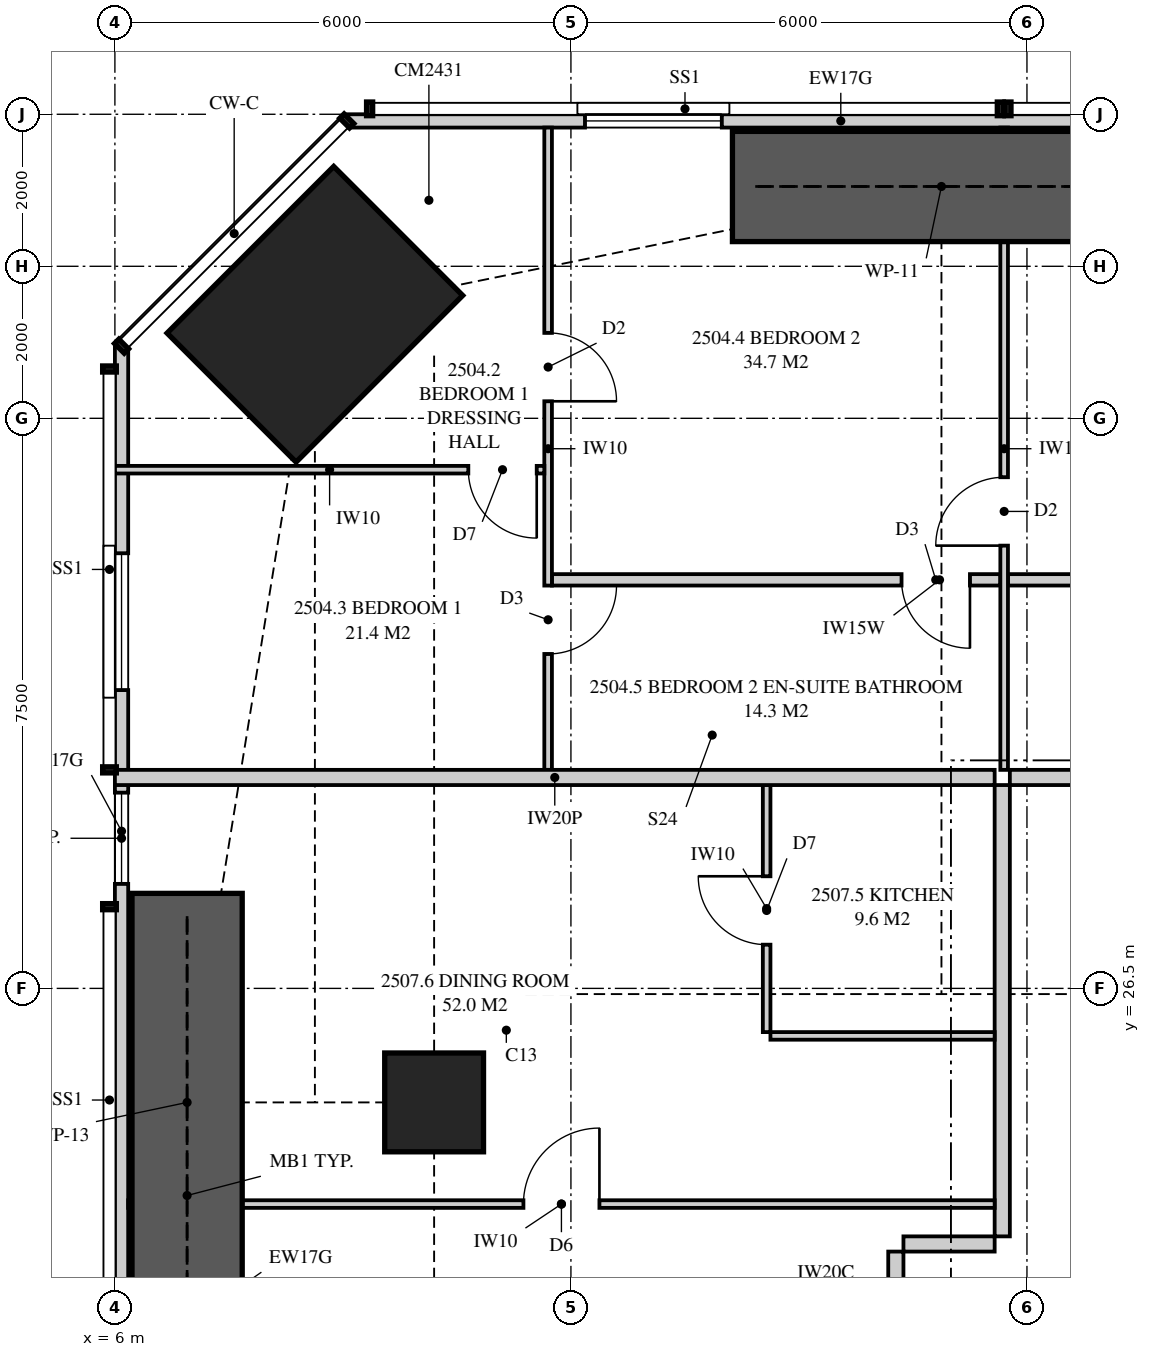
"""IFC4 building model, lengths in metres.
Left out: names, types, materials, properties, quantities, classifications, styles, units other than length and angle.
Written with IfcOpenShell. Run it as: python <this file> out.ifc"""

import sys

from ifc_helpers import new_model, si_unit, direction, frame, frame_2d, origin, origin_2d, place, context, subcontext, project, spatial, polyline, rectangle, outline, extrude, element, fill, save


model = new_model("IFC4")
c1 = context("Model", 3, precision=1e-05, world=origin(), true_north=direction((0.0, 1.0)))
c2 = subcontext(c1, "Body", "Model", "MODEL_VIEW")
j1 = project(units=[si_unit("LENGTHUNIT", "METRE"), si_unit("PLANEANGLEUNIT", "RADIAN")], contexts=[c1])
p1 = place(None, origin())
s1 = spatial("IfcSite", under=j1, at=p1, CompositionType="ELEMENT")
p2 = place(p1, origin())
s2 = spatial("IfcBuilding", under=s1, at=p2, CompositionType="ELEMENT")
p3 = place(p2, frame((0.0, 0.0, 94.8)))
s3 = spatial("IfcBuildingStorey", under=s2, at=p3, CompositionType="ELEMENT", Elevation=94.8)
p4 = place(p3, frame((8.631, 35.369, 0.0), z_axis=(0.0, 0.0, 1.0), x_axis=(0.707106781187, -0.707106781187, 0.0)))
e1 = element("IfcColumn", 1, at=p4, inside=s3, PredefinedType="COLUMN", context=c2, shape_type="SweptSolid", body=[
    extrude(rectangle(XDim=2.4, YDim=3.1, at=origin_2d()), origin(), (0.0, 0.0, 1.0), 3.35),
])
p5 = place(p3, frame((10.2, 25.0, 0.0), z_axis=(0.0, 0.0, 1.0), x_axis=(1.0, 0.0, 0.0)))
e2 = element("IfcColumn", 2, at=p5, inside=s3, PredefinedType="COLUMN", context=c2, shape_type="SweptSolid", body=[
    extrude(rectangle(XDim=1.3, YDim=1.3, at=origin_2d()), origin(), (0.0, 0.0, 1.0), 3.35),
])
p6 = place(p3, frame((22.05, 37.913, 0.0), z_axis=(0.0, 0.0, 1.0), x_axis=(-1.0, 0.0, 0.0)))
e3 = element("IfcWall", 3, at=p6, inside=s3, PredefinedType="SOLIDWALL", context=c2, shape_type="SweptSolid", body=[
    extrude(outline(polyline([(0.0, 0.0), (12.999, 0.0), (12.999, 3.11), (5.378, 3.11), (5.378, 2.15), (5.333, 2.15), (5.333, 3.11), (5.175, 3.11), (5.175, 2.15), (0.0, 2.15), (0.0, 0.0)])), frame((0.0, 0.087, 0.0), z_axis=(0.0, -1.0, 0.0), x_axis=(1.0, 0.0, 0.0)), (0.0, 0.0, 1.0), 0.175),
])
p7 = place(p6, frame((0.492, 0.0, 0.4)))
e4 = element("IfcOpeningElement", 4, at=p7, cuts=e3, PredefinedType="OPENING", context=c2, shape_type="SweptSolid", body=[
    extrude(rectangle(XDim=1.8, YDim=1.7, at=frame_2d((0.9, 0.85))), frame((0.0, 0.097, 0.0), z_axis=(0.0, -1.0, 0.0), x_axis=(1.0, 0.0, 0.0)), (0.0, 0.0, 1.0), 0.195),
])
p8 = place(p6, frame((8.065, 0.0, 0.4)))
e5 = element("IfcOpeningElement", 5, at=p8, cuts=e3, PredefinedType="OPENING", context=c2, shape_type="SweptSolid", body=[
    extrude(rectangle(XDim=1.8, YDim=1.7, at=frame_2d((0.9, 0.85))), frame((0.0, 0.097, 0.0), z_axis=(0.0, -1.0, 0.0), x_axis=(1.0, 0.0, 0.0)), (0.0, 0.0, 1.0), 0.195),
])
p9 = place(p3, frame((6.087, 34.949, 0.0), z_axis=(0.0, 0.0, 1.0), x_axis=(0.0, -1.0, 0.0)))
e6 = element("IfcWall", 6, at=p9, inside=s3, PredefinedType="SOLIDWALL", context=c2, shape_type="SweptSolid", body=[
    extrude(outline(polyline([(0.0, 0.0), (12.761, 0.0), (12.761, 2.15), (9.949, 2.15), (9.949, 3.11), (9.823, 3.11), (9.823, 2.15), (9.73, 2.15), (9.73, 3.11), (0.0, 3.11), (0.0, 0.0)])), frame((0.0, 0.087, 0.0), z_axis=(0.0, -1.0, 0.0), x_axis=(1.0, 0.0, 0.0)), (0.0, 0.0, 1.0), 0.175),
])
p10 = place(p9, frame((2.724, 0.0, 0.4)))
e7 = element("IfcOpeningElement", 7, at=p10, cuts=e6, PredefinedType="OPENING", context=c2, shape_type="SweptSolid", body=[
    extrude(rectangle(XDim=1.8, YDim=1.7, at=frame_2d((0.9, 0.85))), frame((0.0, 0.097, 0.0), z_axis=(0.0, -1.0, 0.0), x_axis=(1.0, 0.0, 0.0)), (0.0, 0.0, 1.0), 0.195),
])
p11 = place(p9, frame((5.874, 0.0, 0.4)))
e8 = element("IfcOpeningElement", 8, at=p11, cuts=e6, PredefinedType="OPENING", context=c2, shape_type="SweptSolid", body=[
    extrude(rectangle(XDim=1.2, YDim=1.7, at=frame_2d((0.6, 0.85))), frame((0.0, 0.097, 0.0), z_axis=(0.0, -1.0, 0.0), x_axis=(1.0, 0.0, 0.0)), (0.0, 0.0, 1.0), 0.195),
])
p12 = place(p3, frame((17.775, 29.275, 0.0), z_axis=(0.0, 0.0, 1.0), x_axis=(1.0, 0.0, 0.0)))
e9 = element("IfcWall", 9, at=p12, inside=s3, PredefinedType="PARTITIONING", context=c2, shape_type="SweptSolid", body=[
    extrude(rectangle(XDim=4.325, YDim=0.2, at=frame_2d((2.163, 0.0))), origin(), (0.0, 0.0, 1.0), 3.11),
])
p13 = place(p3, frame((11.7, 37.825, 0.0), z_axis=(0.0, 0.0, 1.0), x_axis=(0.0, -1.0, 0.0)))
e10 = element("IfcWall", 10, at=p13, inside=s3, PredefinedType="PARTITIONING", context=c2, shape_type="SweptSolid", body=[
    extrude(outline(polyline([(0.0, 0.0), (8.45, 0.0), (8.45, 3.11), (2.708, 3.11), (2.708, 2.15), (0.953, 2.15), (0.953, 3.11), (0.0, 3.11), (0.0, 0.0)])), frame((0.0, 0.05, 0.0), z_axis=(0.0, -1.0, 0.0), x_axis=(1.0, 0.0, 0.0)), (0.0, 0.0, 1.0), 0.1),
])
p14 = place(p13, frame((2.701, 0.0, 0.0)))
e11 = element("IfcOpeningElement", 11, at=p14, cuts=e10, PredefinedType="OPENING", context=c2, shape_type="SweptSolid", body=[
    extrude(rectangle(XDim=0.9, YDim=2.1, at=frame_2d((0.45, 1.05))), frame((0.0, 0.06, 0.0), z_axis=(0.0, -1.0, 0.0), x_axis=(1.0, 0.0, 0.0)), (0.0, 0.0, 1.0), 0.12),
])
p15 = place(p13, frame((6.025, 0.0, 0.0)))
e12 = element("IfcOpeningElement", 12, at=p15, cuts=e10, PredefinedType="OPENING", context=c2, shape_type="SweptSolid", body=[
    extrude(rectangle(XDim=0.9, YDim=2.1, at=frame_2d((0.45, 1.05))), frame((0.0, 0.06, 0.0), z_axis=(0.0, -1.0, 0.0), x_axis=(1.0, 0.0, 0.0)), (0.0, 0.0, 1.0), 0.12),
])
p16 = place(p3, frame((17.7, 37.825, 0.0), z_axis=(0.0, 0.0, 1.0), x_axis=(0.0, -1.0, 0.0)))
e13 = element("IfcWall", 13, at=p16, inside=s3, PredefinedType="PARTITIONING", context=c2, shape_type="SweptSolid", body=[
    extrude(outline(polyline([(1.635, 2.15), (0.0, 2.15), (0.0, 0.0), (8.45, 0.0), (8.45, 3.11), (1.635, 3.11), (1.635, 2.15)]), holes=[polyline([(1.021, 0.116), (0.529, 0.116), (0.529, 0.906), (1.021, 0.906), (1.021, 0.116)]), polyline([(1.021, 1.244), (0.529, 1.244), (0.529, 2.034), (1.021, 2.034), (1.021, 1.244)])]), frame((0.0, 0.05, 0.0), z_axis=(0.0, -1.0, 0.0), x_axis=(1.0, 0.0, 0.0)), (0.0, 0.0, 1.0), 0.1),
])
p17 = place(p16, frame((4.6, 0.0, 0.0)))
e14 = element("IfcOpeningElement", 14, at=p17, cuts=e13, PredefinedType="OPENING", context=c2, shape_type="SweptSolid", body=[
    extrude(rectangle(XDim=0.9, YDim=2.1, at=frame_2d((0.45, 1.05))), frame((0.0, 0.06, 0.0), z_axis=(0.0, -1.0, 0.0), x_axis=(1.0, 0.0, 0.0)), (0.0, 0.0, 1.0), 0.12),
])
p18 = place(p3, frame((6.0, 33.324, 0.0), z_axis=(0.0, 0.0, 1.0), x_axis=(1.0, 0.0, 0.0)))
e15 = element("IfcWall", 15, at=p18, inside=s3, PredefinedType="PARTITIONING", context=c2, shape_type="SweptSolid", body=[
    extrude(outline(polyline([(0.0, 0.0), (5.65, 0.0), (5.65, 3.11), (5.46, 3.11), (5.46, 2.51), (3.171, 2.51), (3.171, 2.15), (1.429, 2.15), (1.429, 3.11), (0.0, 3.11), (0.0, 0.0)])), frame((0.0, 0.05, 0.0), z_axis=(0.0, -1.0, 0.0), x_axis=(1.0, 0.0, 0.0)), (0.0, 0.0, 1.0), 0.1),
])
p19 = place(p18, frame((4.65, 0.0, 0.0)))
e16 = element("IfcOpeningElement", 16, at=p19, cuts=e15, PredefinedType="OPENING", context=c2, shape_type="SweptSolid", body=[
    extrude(rectangle(XDim=0.9, YDim=2.1, at=frame_2d((0.45, 1.05))), frame((0.0, 0.06, 0.0), z_axis=(0.0, -1.0, 0.0), x_axis=(1.0, 0.0, 0.0)), (0.0, 0.0, 1.0), 0.12),
])
p20 = place(p3, frame((11.75, 31.875, 0.0), z_axis=(0.0, 0.0, 1.0), x_axis=(1.0, 0.0, 0.0)))
e17 = element("IfcWall", 17, at=p20, inside=s3, PredefinedType="PLUMBINGWALL", context=c2, shape_type="SweptSolid", body=[
    extrude(outline(polyline([(0.0, 0.0), (5.9, 0.0), (5.9, 3.11), (5.438, 3.11), (5.438, 2.541), (4.812, 2.541), (4.812, 3.11), (0.0, 3.11), (0.0, 0.0)])), frame((0.0, 0.075, 0.0), z_axis=(0.0, -1.0, 0.0), x_axis=(1.0, 0.0, 0.0)), (0.0, 0.0, 1.0), 0.15),
])
p21 = place(p20, frame((4.6, 0.0, 0.0)))
e18 = element("IfcOpeningElement", 18, at=p21, cuts=e17, PredefinedType="OPENING", context=c2, shape_type="SweptSolid", body=[
    extrude(rectangle(XDim=0.9, YDim=2.1, at=frame_2d((0.45, 1.05))), frame((0.0, 0.085, 0.0), z_axis=(0.0, -1.0, 0.0), x_axis=(1.0, 0.0, 0.0)), (0.0, 0.0, 1.0), 0.17),
])
p22 = place(p3, frame((17.75, 31.875, 0.0), z_axis=(0.0, 0.0, 1.0), x_axis=(1.0, 0.0, 0.0)))
e19 = element("IfcWall", 19, at=p22, inside=s3, PredefinedType="PLUMBINGWALL", context=c2, shape_type="SweptSolid", body=[
    extrude(rectangle(XDim=4.2, YDim=0.15, at=frame_2d((2.1, 0.0))), origin(), (0.0, 0.0, 1.0), 3.11),
])
p23 = place(p3, frame((6.0, 29.275, 0.0), z_axis=(0.0, 0.0, 1.0), x_axis=(1.0, 0.0, 0.0)))
e20 = element("IfcWall", 20, at=p23, inside=s3, PredefinedType="PARTITIONING", context=c2, shape_type="SweptSolid", body=[
    extrude(outline(polyline([(0.0, 0.0), (11.575, 0.0), (11.575, 3.11), (11.212, 3.11), (11.212, 2.541), (10.538, 2.541), (10.538, 3.11), (5.51, 3.11), (5.51, 2.51), (2.969, 2.51), (2.969, 2.541), (2.565, 2.541), (2.565, 2.15), (0.721, 2.15), (0.721, 3.11), (0.0, 3.11), (0.0, 0.0)])), frame((0.0, 0.1, 0.0), z_axis=(0.0, -1.0, 0.0), x_axis=(1.0, 0.0, 0.0)), (0.0, 0.0, 1.0), 0.2),
])
p24 = place(p3, frame((14.575, 25.925, 0.0), z_axis=(0.0, 0.0, 1.0), x_axis=(0.0, 1.0, 0.0)))
e21 = element("IfcWall", 21, at=p24, inside=s3, PredefinedType="PARTITIONING", context=c2, shape_type="SweptSolid", body=[
    extrude(outline(polyline([(0.0, 0.0), (3.25, 0.0), (3.25, 3.11), (0.787, 3.11), (0.787, 2.541), (0.213, 2.541), (0.213, 3.11), (0.0, 3.11), (0.0, 0.0)])), frame((0.0, 0.05, 0.0), z_axis=(0.0, -1.0, 0.0), x_axis=(1.0, 0.0, 0.0)), (0.0, 0.0, 1.0), 0.1),
])
p25 = place(p24, frame((1.15, 0.0, 0.0)))
e22 = element("IfcOpeningElement", 22, at=p25, cuts=e21, PredefinedType="OPENING", context=c2, shape_type="SweptSolid", body=[
    extrude(rectangle(XDim=0.9, YDim=2.1, at=frame_2d((0.45, 1.05))), frame((0.0, 0.06, 0.0), z_axis=(0.0, -1.0, 0.0), x_axis=(1.0, 0.0, 0.0)), (0.0, 0.0, 1.0), 0.12),
])
p26 = place(p3, frame((14.625, 25.875, 0.0), z_axis=(0.0, 0.0, 1.0), x_axis=(1.0, 0.0, 0.0)))
e23 = element("IfcWall", 23, at=p26, inside=s3, PredefinedType="PARTITIONING", context=c2, shape_type="SweptSolid", body=[
    extrude(rectangle(XDim=2.95, YDim=0.1, at=frame_2d((1.475, 0.0))), origin(), (0.0, 0.0, 1.0), 3.11),
])
p27 = place(p3, frame((6.175, 23.663, 0.0), z_axis=(0.0, 0.0, 1.0), x_axis=(1.0, 0.0, 0.0)))
e24 = element("IfcWall", 24, at=p27, inside=s3, PredefinedType="PARTITIONING", context=c2, shape_type="SweptSolid", body=[
    extrude(outline(polyline([(0.529, 2.15), (0.0, 2.15), (0.0, 0.0), (0.529, 0.0), (0.529, 0.555), (1.021, 0.555), (1.021, 0.0), (11.4, 0.0), (11.4, 3.11), (5.285, 3.11), (5.285, 2.51), (2.765, 2.51), (2.765, 3.11), (1.635, 3.11), (1.635, 2.15), (1.021, 2.15), (1.021, 1.594), (0.529, 1.594), (0.529, 2.15)])), frame((0.0, 0.05, 0.0), z_axis=(0.0, -1.0, 0.0), x_axis=(1.0, 0.0, 0.0)), (0.0, 0.0, 1.0), 0.1),
])
p28 = place(p27, frame((5.2, 0.0, 0.0)))
e25 = element("IfcOpeningElement", 25, at=p28, cuts=e24, PredefinedType="OPENING", context=c2, shape_type="SweptSolid", body=[
    extrude(rectangle(XDim=1.0, YDim=2.1, at=frame_2d((0.5, 1.05))), frame((0.0, 0.06, 0.0), z_axis=(0.0, -1.0, 0.0), x_axis=(1.0, 0.0, 0.0)), (0.0, 0.0, 1.0), 0.12),
])
p29 = place(p3, frame((17.675, 23.238, 0.0), z_axis=(0.0, 0.0, 1.0), x_axis=(0.0, 1.0, 0.0)))
e26 = element("IfcWall", 26, at=p29, inside=s3, PredefinedType="PARTITIONING", context=c2, shape_type="SweptSolid", body=[
    extrude(outline(polyline([(0.0, 0.0), (5.938, 0.0), (5.938, 3.11), (3.525, 3.11), (3.525, 2.541), (2.85, 2.541), (2.85, 3.11), (0.0, 3.11), (0.0, 0.0)])), frame((0.0, 0.1, 0.0), z_axis=(0.0, -1.0, 0.0), x_axis=(1.0, 0.0, 0.0)), (0.0, 0.0, 1.0), 0.2),
])
p30 = place(p3, frame((16.275, 20.637, 0.0), z_axis=(0.0, 0.0, 1.0), x_axis=(0.0, 1.0, 0.0)))
e27 = element("IfcWall", 27, at=p30, inside=s3, PredefinedType="PARTITIONING", context=c2, shape_type="SweptSolid", body=[
    extrude(rectangle(XDim=2.4, YDim=0.2, at=frame_2d((1.2, 0.0))), origin(), (0.0, 0.0, 1.0), 3.11),
])
p31 = place(p30, frame((0.7, 0.0, 0.0)))
e28 = element("IfcOpeningElement", 28, at=p31, cuts=e27, PredefinedType="OPENING", context=c2, shape_type="SweptSolid", body=[
    extrude(rectangle(XDim=1.05, YDim=2.2, at=frame_2d((0.525, 1.1))), frame((0.0, 0.11, 0.0), z_axis=(0.0, -1.0, 0.0), x_axis=(1.0, 0.0, 0.0)), (0.0, 0.0, 1.0), 0.22),
])
p32 = place(p3, frame((17.575, 23.137, 0.0), z_axis=(0.0, 0.0, 1.0), x_axis=(-1.0, 0.0, 0.0)))
e29 = element("IfcWall", 29, at=p32, inside=s3, PredefinedType="PARTITIONING", context=c2, shape_type="SweptSolid", body=[
    extrude(rectangle(XDim=1.2, YDim=0.2, at=frame_2d((0.6, 0.0))), origin(), (0.0, 0.0, 1.0), 3.11),
])
for number, where, z_axis, x_axis in (
    (30, (14.125, 37.05, 0.0), (0.0, 0.0, 1.0), (1.0, 0.0, 0.0)),
    (31, (6.95, 22.25, 0.0), (0.0, 0.0, 1.0), (0.0, 1.0, 0.0)),
):
    element("IfcWall", number, at=place(p3, frame(where, z_axis=z_axis, x_axis=x_axis)), inside=s3, PredefinedType="SHEAR", context=c2, shape_type="SweptSolid", body=[
        extrude(rectangle(XDim=5.5, YDim=1.45, at=frame_2d((2.75, 0.0))), origin(), (0.0, 0.0, 1.0), 3.35),
    ])
p33 = place(p8, origin())
e32 = element("IfcWindow", 32, at=p33, inside=s3, PartitioningType="SINGLE_PANEL", PredefinedType="WINDOW", context=c2, shape_type="SweptSolid", body=[
    extrude(rectangle(XDim=1.8, YDim=1.7, at=frame_2d((0.9, 0.85))), frame((0.0, 0.03, 0.0), z_axis=(0.0, -1.0, 0.0), x_axis=(1.0, 0.0, 0.0)), (0.0, 0.0, 1.0), 0.06),
])
fill(e5, e32)
p34 = place(p10, origin())
e33 = element("IfcWindow", 33, at=p34, inside=s3, PartitioningType="SINGLE_PANEL", PredefinedType="WINDOW", context=c2, shape_type="SweptSolid", body=[
    extrude(rectangle(XDim=1.8, YDim=1.7, at=frame_2d((0.9, 0.85))), frame((0.0, 0.03, 0.0), z_axis=(0.0, -1.0, 0.0), x_axis=(1.0, 0.0, 0.0)), (0.0, 0.0, 1.0), 0.06),
])
fill(e7, e33)
p35 = place(p11, origin())
e34 = element("IfcWindow", 34, at=p35, inside=s3, PartitioningType="SINGLE_PANEL", PredefinedType="WINDOW", context=c2, shape_type="SweptSolid", body=[
    extrude(rectangle(XDim=1.2, YDim=1.7, at=frame_2d((0.6, 0.85))), frame((0.0, 0.03, 0.0), z_axis=(0.0, -1.0, 0.0), x_axis=(1.0, 0.0, 0.0)), (0.0, 0.0, 1.0), 0.06),
])
fill(e8, e34)
p36 = place(p19, frame((0.9, 0.0, 0.0), z_axis=(0.0, 0.0, 1.0), x_axis=(-1.0, 0.0, 0.0)))
e35 = element("IfcDoor", 35, at=p36, inside=s3, OperationType="SINGLE_SWING_LEFT", PredefinedType="DOOR", context=c2, shape_type="SweptSolid", body=[
    extrude(rectangle(XDim=0.9, YDim=2.1, at=frame_2d((0.45, 1.05))), frame((0.0, 0.025, 0.0), z_axis=(0.0, -1.0, 0.0), x_axis=(1.0, 0.0, 0.0)), (0.0, 0.0, 1.0), 0.05),
])
fill(e16, e35)
p37 = place(p14, origin())
e36 = element("IfcDoor", 36, at=p37, inside=s3, OperationType="SINGLE_SWING_RIGHT", PredefinedType="DOOR", context=c2, shape_type="SweptSolid", body=[
    extrude(rectangle(XDim=0.9, YDim=2.1, at=frame_2d((0.45, 1.05))), frame((0.0, 0.025, 0.0), z_axis=(0.0, -1.0, 0.0), x_axis=(1.0, 0.0, 0.0)), (0.0, 0.0, 1.0), 0.05),
])
fill(e11, e36)
p38 = place(p17, frame((0.9, 0.0, 0.0), z_axis=(0.0, 0.0, 1.0), x_axis=(-1.0, 0.0, 0.0)))
e37 = element("IfcDoor", 37, at=p38, inside=s3, OperationType="SINGLE_SWING_LEFT", PredefinedType="DOOR", context=c2, shape_type="SweptSolid", body=[
    extrude(rectangle(XDim=0.9, YDim=2.1, at=frame_2d((0.45, 1.05))), frame((0.0, 0.025, 0.0), z_axis=(0.0, -1.0, 0.0), x_axis=(1.0, 0.0, 0.0)), (0.0, 0.0, 1.0), 0.05),
])
fill(e14, e37)
p39 = place(p21, frame((0.9, 0.0, 0.0), z_axis=(0.0, 0.0, 1.0), x_axis=(-1.0, 0.0, 0.0)))
e38 = element("IfcDoor", 38, at=p39, inside=s3, OperationType="SINGLE_SWING_LEFT", PredefinedType="DOOR", context=c2, shape_type="SweptSolid", body=[
    extrude(rectangle(XDim=0.9, YDim=2.1, at=frame_2d((0.45, 1.05))), frame((0.0, 0.025, 0.0), z_axis=(0.0, -1.0, 0.0), x_axis=(1.0, 0.0, 0.0)), (0.0, 0.0, 1.0), 0.05),
])
fill(e18, e38)
p40 = place(p15, origin())
e39 = element("IfcDoor", 39, at=p40, inside=s3, OperationType="SINGLE_SWING_LEFT", PredefinedType="DOOR", context=c2, shape_type="SweptSolid", body=[
    extrude(rectangle(XDim=0.9, YDim=2.1, at=frame_2d((0.45, 1.05))), frame((0.0, 0.025, 0.0), z_axis=(0.0, -1.0, 0.0), x_axis=(1.0, 0.0, 0.0)), (0.0, 0.0, 1.0), 0.05),
])
fill(e12, e39)
p41 = place(p25, origin())
e40 = element("IfcDoor", 40, at=p41, inside=s3, OperationType="SINGLE_SWING_RIGHT", PredefinedType="DOOR", context=c2, shape_type="SweptSolid", body=[
    extrude(rectangle(XDim=0.9, YDim=2.1, at=frame_2d((0.45, 1.05))), frame((0.0, 0.025, 0.0), z_axis=(0.0, -1.0, 0.0), x_axis=(1.0, 0.0, 0.0)), (0.0, 0.0, 1.0), 0.05),
])
fill(e22, e40)
p42 = place(p28, origin())
e41 = element("IfcDoor", 41, at=p42, inside=s3, OperationType="SINGLE_SWING_RIGHT", PredefinedType="DOOR", context=c2, shape_type="SweptSolid", body=[
    extrude(rectangle(XDim=1.0, YDim=2.1, at=frame_2d((0.5, 1.05))), frame((0.0, 0.025, 0.0), z_axis=(0.0, -1.0, 0.0), x_axis=(1.0, 0.0, 0.0)), (0.0, 0.0, 1.0), 0.05),
])
fill(e25, e41)
save(model, sys.argv[1])
